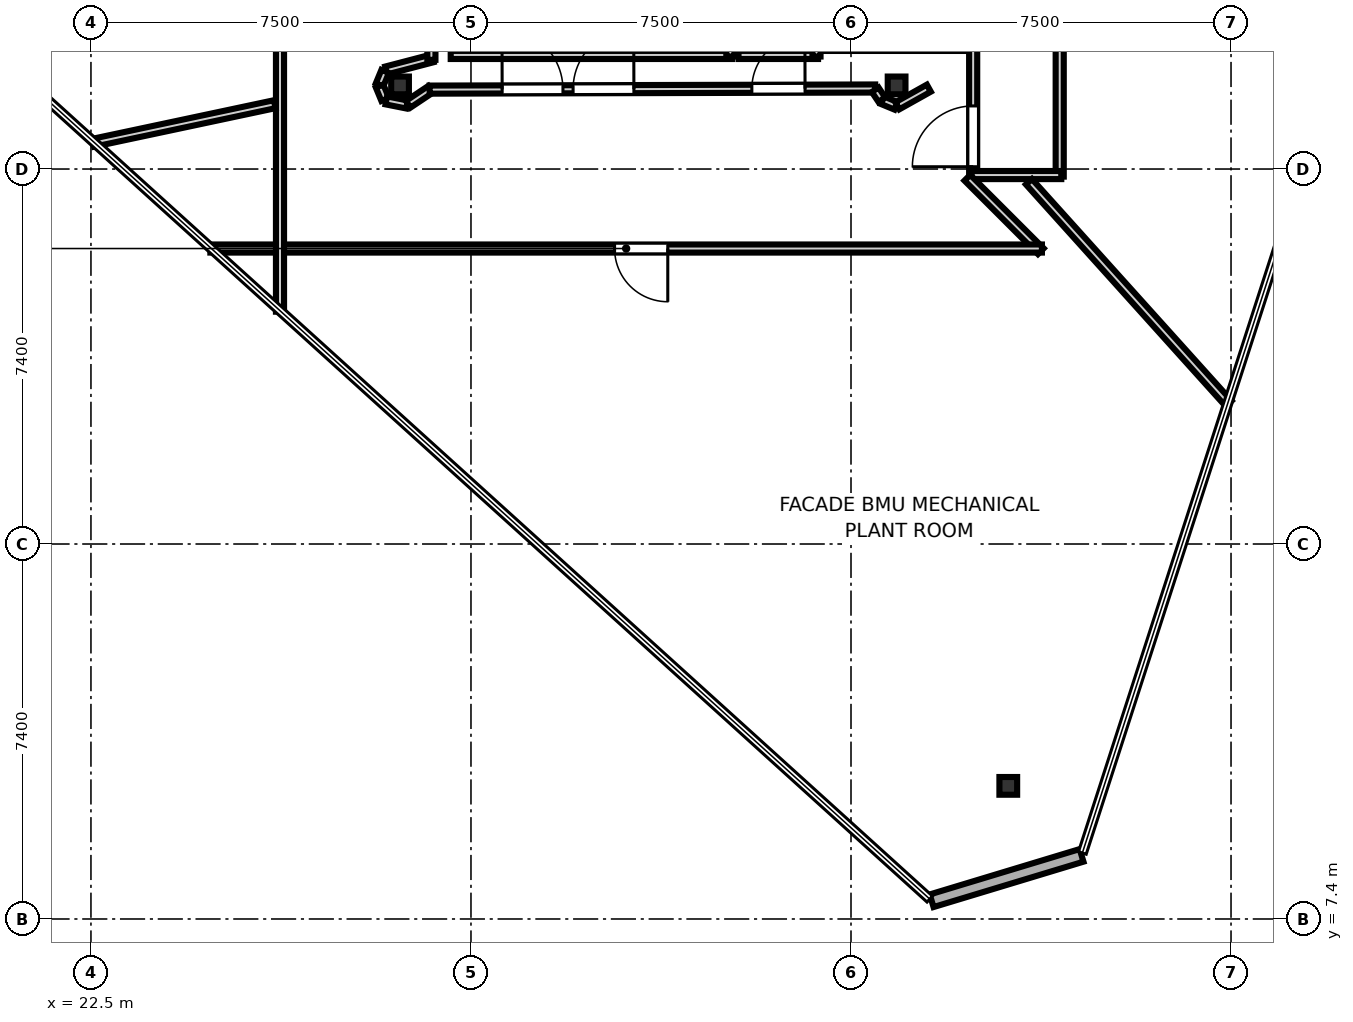
"""IFC4 building model, lengths in metres.
Left out: names, types, materials, properties, quantities, classifications, styles, units other than length and angle.
Written with IfcOpenShell. Run it as: python <this file> out.ifc"""

import sys

from ifc_helpers import new_model, si_unit, direction, frame, frame_2d, origin, origin_2d, place, context, subcontext, project, spatial, rectangle, i_section, extrude, element, fill, save


model = new_model("IFC4")
c1 = context("Model", 3, precision=1e-05, world=origin(), true_north=direction((0.0, 1.0)))
c2 = subcontext(c1, "Body", "Model", "MODEL_VIEW")
j1 = project(units=[si_unit("LENGTHUNIT", "METRE"), si_unit("PLANEANGLEUNIT", "RADIAN")], contexts=[c1])
p1 = place(None, origin())
s1 = spatial("IfcSite", under=j1, at=p1, CompositionType="ELEMENT")
p2 = place(p1, origin())
s2 = spatial("IfcBuilding", under=s1, at=p2, CompositionType="ELEMENT")
p3 = place(p2, frame((0.0, 0.0, 363.8)))
s3 = spatial("IfcBuildingStorey", under=s2, at=p3, CompositionType="ELEMENT", Elevation=363.8)
for number, where, z_axis, x_axis in (
    (1, (28.6, 23.85, 0.0), (0.0, 0.0, 1.0), (1.0, 0.0, 0.0)),
    (2, (38.4, 23.85, 0.0), (0.0, 0.0, 1.0), (1.0, 0.0, 0.0)),
    (3, (40.604, 10.027, 0.0), (0.0, 0.0, 1.0), (1.0, 0.0, 0.0)),
):
    element("IfcColumn", number, at=place(p3, frame(where, z_axis=z_axis, x_axis=x_axis)), inside=s3, PredefinedType="COLUMN", context=c2, shape_type="SweptSolid", body=[
        extrude(i_section(OverallWidth=0.35, OverallDepth=0.35, WebThickness=0.012, FlangeThickness=0.019, at=origin_2d()), origin(), (0.0, 0.0, 1.0), 3.75),
    ])
p4 = place(p3, frame((39.091, 7.76, 0.0), z_axis=(0.0, 0.0, 1.0), x_axis=(0.957149847589, 0.289593109828, 0.0)))
e4 = element("IfcWall", 4, at=p4, inside=s3, PredefinedType="SOLIDWALL", context=c2, shape_type="SweptSolid", body=[
    extrude(rectangle(XDim=3.092, YDim=0.26, at=frame_2d((1.546, 0.0))), origin(), (0.0, 0.0, 1.0), 3.55),
])
p5 = place(p3, frame((35.15, 24.451, 0.0), z_axis=(0.0, 0.0, 1.0), x_axis=(-1.0, 0.0, 0.0)))
e5 = element("IfcWall", 5, at=p5, inside=s3, PredefinedType="PARTITIONING", context=c2, shape_type="SweptSolid", body=[
    extrude(rectangle(XDim=5.55, YDim=0.16, at=frame_2d((2.775, 0.0))), origin(), (0.0, 0.0, 1.0), 2.87),
])
p6 = place(p3, frame((35.119, 29.38, 0.0), z_axis=(0.0, 0.0, 1.0), x_axis=(0.0, -1.0, 0.0)))
e6 = element("IfcWall", 6, at=p6, inside=s3, PredefinedType="PARTITIONING", context=c2, shape_type="SweptSolid", body=[
    extrude(rectangle(XDim=4.96, YDim=0.16, at=frame_2d((2.48, 0.0))), origin(), (0.0, 0.0, 1.0), 2.08),
])
p7 = place(p3, frame((39.911, 22.05, 0.0), z_axis=(0.0, 0.0, 1.0), x_axis=(0.0, 1.0, 0.0)))
e7 = element("IfcWall", 7, at=p7, inside=s3, PredefinedType="PARTITIONING", context=c2, shape_type="SweptSolid", body=[
    extrude(rectangle(XDim=2.71, YDim=0.16, at=frame_2d((1.355, 0.0))), origin(), (0.0, 0.0, 1.0), 2.87),
])
p8 = place(p7, frame((0.195, 0.0, 0.0)))
e8 = element("IfcOpeningElement", 8, at=p8, cuts=e7, PredefinedType="OPENING", context=c2, shape_type="SweptSolid", body=[
    extrude(rectangle(XDim=1.2, YDim=2.15, at=frame_2d((0.6, 1.075))), frame((0.0, 0.09, 0.0), z_axis=(0.0, -1.0, 0.0), x_axis=(1.0, 0.0, 0.0)), (0.0, 0.0, 1.0), 0.18),
])
p9 = place(p3, frame((41.619, 34.8, 0.0), z_axis=(0.0, 0.0, 1.0), x_axis=(0.0, -1.0, 0.0)))
e9 = element("IfcWall", 9, at=p9, inside=s3, PredefinedType="PARTITIONING", context=c2, shape_type="SweptSolid", body=[
    extrude(rectangle(XDim=12.75, YDim=0.16, at=frame_2d((6.375, 0.0))), origin(), (0.0, 0.0, 1.0), 2.87),
])
p10 = place(p9, frame((5.85, 0.0, 0.0)))
e10 = element("IfcOpeningElement", 10, at=p10, cuts=e9, PredefinedType="OPENING", context=c2, shape_type="SweptSolid", body=[
    extrude(rectangle(XDim=1.05, YDim=2.15, at=frame_2d((0.525, 1.075))), frame((0.0, 0.09, 0.0), z_axis=(0.0, -1.0, 0.0), x_axis=(1.0, 0.0, 0.0)), (0.0, 0.0, 1.0), 0.18),
])
p11 = place(p3, frame((41.65, 22.081, 0.0), z_axis=(0.0, 0.0, 1.0), x_axis=(-1.0, 0.0, 0.0)))
e11 = element("IfcWall", 11, at=p11, inside=s3, PredefinedType="PARTITIONING", context=c2, shape_type="SweptSolid", body=[
    extrude(rectangle(XDim=1.77, YDim=0.16, at=frame_2d((0.885, 0.0))), origin(), (0.0, 0.0, 1.0), 2.87),
])
p12 = place(p3, frame((36.85, 24.451, 0.0), z_axis=(0.0, 0.0, 1.0), x_axis=(-1.0, 0.0, 0.0)))
e12 = element("IfcWall", 12, at=p12, inside=s3, PredefinedType="PARTITIONING", context=c2, shape_type="SweptSolid", body=[
    extrude(rectangle(XDim=1.57, YDim=0.16, at=frame_2d((0.785, 0.0))), origin(), (0.0, 0.0, 1.0), 2.87),
])
p13 = place(p3, frame((36.819, 29.38, 0.0), z_axis=(0.0, 0.0, 1.0), x_axis=(0.0, -1.0, 0.0)))
e13 = element("IfcWall", 13, at=p13, inside=s3, PredefinedType="PARTITIONING", context=c2, shape_type="SweptSolid", body=[
    extrude(rectangle(XDim=4.96, YDim=0.16, at=frame_2d((2.48, 0.0))), origin(), (0.0, 0.0, 1.0), 2.87),
])
p14 = place(p3, frame((29.242, 24.384, 0.0), z_axis=(0.0, 0.0, 1.0), x_axis=(-0.967554205956, -0.252663528309, 0.0)))
e14 = element("IfcWall", 14, at=p14, inside=s3, PredefinedType="PARTITIONING", context=c2, shape_type="SweptSolid", body=[
    extrude(rectangle(XDim=0.946, YDim=0.16, at=frame_2d((0.473, 0.0))), origin(), (0.0, 0.0, 1.0), 2.87),
])
for number, where, z_axis, x_axis in (
    (15, (28.306, 24.127, 0.0), (0.0, 0.0, 1.0), (-0.383, -0.924, 0.0)),
    (16, (28.196, 23.838, 0.0), (0.0, 0.0, 1.0), (0.383, -0.924, 0.0)),
):
    element("IfcWall", number, at=place(p3, frame(where, z_axis=z_axis, x_axis=x_axis)), inside=s3, PredefinedType="PARTITIONING", context=c2, shape_type="SweptSolid", body=[
        extrude(rectangle(XDim=0.287, YDim=0.16, at=frame_2d((0.144, 0.0))), origin(), (0.0, 0.0, 1.0), 2.87),
    ])
p15 = place(p3, frame((28.329, 23.554, 0.0), z_axis=(0.0, 0.0, 1.0), x_axis=(0.980782960085, -0.195101986683, 0.0)))
e17 = element("IfcWall", 17, at=p15, inside=s3, PredefinedType="PARTITIONING", context=c2, shape_type="SweptSolid", body=[
    extrude(rectangle(XDim=0.417, YDim=0.16, at=frame_2d((0.208, 0.0))), origin(), (0.0, 0.0, 1.0), 2.87),
])
p16 = place(p3, frame((28.761, 23.478, 0.0), z_axis=(0.0, 0.0, 1.0), x_axis=(0.831482899293, 0.555550347118, 0.0)))
e18 = element("IfcWall", 18, at=p16, inside=s3, PredefinedType="PARTITIONING", context=c2, shape_type="SweptSolid", body=[
    extrude(rectangle(XDim=0.53, YDim=0.16, at=frame_2d((0.265, 0.0))), origin(), (0.0, 0.0, 1.0), 2.87),
])
p17 = place(p3, frame((29.184, 23.767, 0.0), z_axis=(0.0, 0.0, 1.0), x_axis=(0.999996878137, 0.002498742824, 0.0)))
e19 = element("IfcWall", 19, at=p17, inside=s3, PredefinedType="PARTITIONING", context=c2, shape_type="SweptSolid", body=[
    extrude(rectangle(XDim=8.793, YDim=0.16, at=frame_2d((4.397, 0.0))), origin(), (0.0, 0.0, 1.0), 2.87),
])
p18 = place(p17, frame((2.831, 0.0, 0.0)))
e20 = element("IfcOpeningElement", 20, at=p18, cuts=e19, PredefinedType="OPENING", context=c2, shape_type="SweptSolid", body=[
    extrude(rectangle(XDim=1.2, YDim=2.15, at=frame_2d((0.6, 1.075))), frame((0.0, 0.09, 0.0), z_axis=(0.0, -1.0, 0.0), x_axis=(1.0, 0.0, 0.0)), (0.0, 0.0, 1.0), 0.18),
])
p19 = place(p17, frame((6.359, 0.0, 0.0)))
e21 = element("IfcOpeningElement", 21, at=p19, cuts=e19, PredefinedType="OPENING", context=c2, shape_type="SweptSolid", body=[
    extrude(rectangle(XDim=1.05, YDim=2.15, at=frame_2d((0.525, 1.075))), frame((0.0, 0.09, 0.0), z_axis=(0.0, -1.0, 0.0), x_axis=(1.0, 0.0, 0.0)), (0.0, 0.0, 1.0), 0.18),
])
p20 = place(p17, frame((1.431, 0.0, 0.0)))
e22 = element("IfcOpeningElement", 22, at=p20, cuts=e19, PredefinedType="OPENING", context=c2, shape_type="SweptSolid", body=[
    extrude(rectangle(XDim=1.2, YDim=2.15, at=frame_2d((0.6, 1.075))), frame((0.0, 0.09, 0.0), z_axis=(0.0, -1.0, 0.0), x_axis=(1.0, 0.0, 0.0)), (0.0, 0.0, 1.0), 0.18),
])
p21 = place(p3, frame((37.978, 23.764, 0.0), z_axis=(0.0, 0.0, 1.0), x_axis=(0.556130652598, -0.831094878604, 0.0)))
e23 = element("IfcWall", 23, at=p21, inside=s3, PredefinedType="PARTITIONING", context=c2, shape_type="SweptSolid", body=[
    extrude(rectangle(XDim=0.236, YDim=0.16, at=frame_2d((0.118, 0.0))), origin(), (0.0, 0.0, 1.0), 2.87),
])
p22 = place(p3, frame((38.123, 23.556, 0.0), z_axis=(0.0, 0.0, 1.0), x_axis=(0.92383017907, -0.382802560388, 0.0)))
e24 = element("IfcWall", 24, at=p22, inside=s3, PredefinedType="PARTITIONING", context=c2, shape_type="SweptSolid", body=[
    extrude(rectangle(XDim=0.287, YDim=0.16, at=frame_2d((0.144, 0.0))), origin(), (0.0, 0.0, 1.0), 2.87),
])
p23 = place(p3, frame((38.415, 23.448, 0.0), z_axis=(0.0, 0.0, 1.0), x_axis=(0.872599584194, 0.488436245241, 0.0)))
e25 = element("IfcWall", 25, at=p23, inside=s3, PredefinedType="PARTITIONING", context=c2, shape_type="SweptSolid", body=[
    extrude(rectangle(XDim=0.712, YDim=0.16, at=frame_2d((0.356, 0.0))), origin(), (0.0, 0.0, 1.0), 2.87),
])
p24 = place(p3, frame((39.796, 22.028, 0.0), z_axis=(0.0, 0.0, 1.0), x_axis=(0.707106781187, -0.707106781187, 0.0)))
e26 = element("IfcWall", 26, at=p24, inside=s3, PredefinedType="PARTITIONING", context=c2, shape_type="SweptSolid", body=[
    extrude(rectangle(XDim=2.051, YDim=0.16, at=frame_2d((1.025, 0.0))), origin(), (0.0, 0.0, 1.0), 2.87),
])
p25 = place(p3, frame((41.268, 20.631, 0.0), z_axis=(0.0, 0.0, 1.0), x_axis=(-1.0, 0.0, 0.0)))
e27 = element("IfcWall", 27, at=p25, inside=s3, PredefinedType="PARTITIONING", context=c2, shape_type="SweptSolid", body=[
    extrude(rectangle(XDim=16.412, YDim=0.16, at=frame_2d((8.206, 0.0))), origin(), (0.0, 0.0, 1.0), 2.87),
])
p26 = place(p25, frame((7.384, 0.0, 0.0)))
e28 = element("IfcOpeningElement", 28, at=p26, cuts=e27, PredefinedType="OPENING", context=c2, shape_type="SweptSolid", body=[
    extrude(rectangle(XDim=1.05, YDim=2.15, at=frame_2d((0.525, 1.075))), frame((0.0, 0.09, 0.0), z_axis=(0.0, -1.0, 0.0), x_axis=(1.0, 0.0, 0.0)), (0.0, 0.0, 1.0), 0.18),
])
p27 = place(p3, frame((26.231, 19.385, 0.0), z_axis=(0.0, 0.0, 1.0), x_axis=(0.0, 1.0, 0.0)))
e29 = element("IfcWall", 29, at=p27, inside=s3, PredefinedType="PARTITIONING", context=c2, shape_type="SweptSolid", body=[
    extrude(rectangle(XDim=12.263, YDim=0.16, at=frame_2d((6.132, 0.0))), origin(), (0.0, 0.0, 1.0), 2.87),
])
p28 = place(p27, frame((7.369, 0.0, 0.0)))
e30 = element("IfcOpeningElement", 30, at=p28, cuts=e29, PredefinedType="OPENING", context=c2, shape_type="SweptSolid", body=[
    extrude(rectangle(XDim=1.05, YDim=2.15, at=frame_2d((0.525, 1.075))), frame((0.0, 0.09, 0.0), z_axis=(0.0, -1.0, 0.0), x_axis=(1.0, 0.0, 0.0)), (0.0, 0.0, 1.0), 0.18),
])
p29 = place(p3, frame((29.219, 32.954, 0.0), z_axis=(0.0, 0.0, 1.0), x_axis=(0.0, -1.0, 0.0)))
e31 = element("IfcWall", 31, at=p29, inside=s3, PredefinedType="PARTITIONING", context=c2, shape_type="SweptSolid", body=[
    extrude(rectangle(XDim=8.6, YDim=0.16, at=frame_2d((4.3, 0.0))), origin(), (0.0, 0.0, 1.0), 2.87),
])
p30 = place(p3, frame((22.547, 22.719, 0.0), z_axis=(0.0, 0.0, 1.0), x_axis=(0.978151559121, 0.2078930672, 0.0)))
e32 = element("IfcWall", 32, at=p30, inside=s3, PredefinedType="PARTITIONING", context=c2, shape_type="SweptSolid", body=[
    extrude(rectangle(XDim=3.659, YDim=0.16, at=frame_2d((1.83, 0.0))), origin(), (0.0, 0.0, 1.0), 2.87),
])
p31 = place(p3, frame((41.011, 21.949, 0.0), z_axis=(0.0, 0.0, 1.0), x_axis=(0.669120448738, -0.743153971315, 0.0)))
e33 = element("IfcWall", 33, at=p31, inside=s3, PredefinedType="PARTITIONING", context=c2, shape_type="SweptSolid", body=[
    extrude(rectangle(XDim=5.89, YDim=0.16, at=frame_2d((2.945, 0.0))), origin(), (0.0, 0.0, 1.0), 2.87),
])
p32 = place(p18, origin())
e34 = element("IfcDoor", 34, at=p32, inside=s3, OperationType="SINGLE_SWING_RIGHT", PredefinedType="DOOR", context=c2, shape_type="SweptSolid", body=[
    extrude(rectangle(XDim=1.2, YDim=2.15, at=frame_2d((0.6, 1.075))), frame((0.0, 0.025, 0.0), z_axis=(0.0, -1.0, 0.0), x_axis=(1.0, 0.0, 0.0)), (0.0, 0.0, 1.0), 0.05),
])
fill(e20, e34)
p33 = place(p8, origin())
e35 = element("IfcDoor", 35, at=p33, inside=s3, OperationType="SINGLE_SWING_LEFT", PredefinedType="DOOR", context=c2, shape_type="SweptSolid", body=[
    extrude(rectangle(XDim=1.2, YDim=2.15, at=frame_2d((0.6, 1.075))), frame((0.0, 0.025, 0.0), z_axis=(0.0, -1.0, 0.0), x_axis=(1.0, 0.0, 0.0)), (0.0, 0.0, 1.0), 0.05),
])
fill(e8, e35)
p34 = place(p19, origin())
e36 = element("IfcDoor", 36, at=p34, inside=s3, OperationType="SINGLE_SWING_RIGHT", PredefinedType="DOOR", context=c2, shape_type="SweptSolid", body=[
    extrude(rectangle(XDim=1.05, YDim=2.15, at=frame_2d((0.525, 1.075))), frame((0.0, 0.025, 0.0), z_axis=(0.0, -1.0, 0.0), x_axis=(1.0, 0.0, 0.0)), (0.0, 0.0, 1.0), 0.05),
])
fill(e21, e36)
p35 = place(p20, origin())
e37 = element("IfcDoor", 37, at=p35, inside=s3, OperationType="SINGLE_SWING_LEFT", PredefinedType="DOOR", context=c2, shape_type="SweptSolid", body=[
    extrude(rectangle(XDim=1.2, YDim=2.15, at=frame_2d((0.6, 1.075))), frame((0.0, 0.025, 0.0), z_axis=(0.0, -1.0, 0.0), x_axis=(1.0, 0.0, 0.0)), (0.0, 0.0, 1.0), 0.05),
])
fill(e22, e37)
p36 = place(p26, origin())
e38 = element("IfcDoor", 38, at=p36, inside=s3, OperationType="SINGLE_SWING_LEFT", PredefinedType="DOOR", context=c2, shape_type="SweptSolid", body=[
    extrude(rectangle(XDim=1.05, YDim=2.15, at=frame_2d((0.525, 1.075))), frame((0.0, 0.025, 0.0), z_axis=(0.0, -1.0, 0.0), x_axis=(1.0, 0.0, 0.0)), (0.0, 0.0, 1.0), 0.05),
])
fill(e28, e38)
save(model, sys.argv[1])
